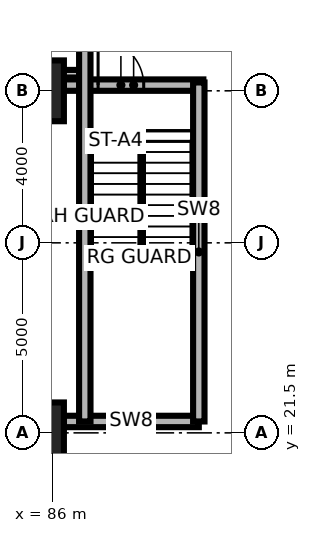
"""IFC4 building model, lengths in metres.
Left out: names, types, materials, properties, quantities, classifications, styles, units other than length and angle.
Written with IfcOpenShell. Run it as: python <this file> out.ifc"""

import sys

from ifc_helpers import new_model, si_unit, direction, frame, frame_2d, origin, origin_2d, place, context, subcontext, project, spatial, rectangle, extrude, element, fill, save


model = new_model("IFC4")
c1 = context("Model", 3, precision=1e-05, world=origin(), true_north=direction((0.0, 1.0)))
c2 = subcontext(c1, "Body", "Model", "MODEL_VIEW")
j1 = project(units=[si_unit("LENGTHUNIT", "METRE"), si_unit("PLANEANGLEUNIT", "RADIAN")], contexts=[c1])
p1 = place(None, origin())
s1 = spatial("IfcSite", under=j1, at=p1, CompositionType="ELEMENT")
p2 = place(p1, origin())
s2 = spatial("IfcBuilding", under=s1, at=p2, CompositionType="ELEMENT")
p3 = place(p2, origin())
s3 = spatial("IfcBuildingStorey", under=s2, at=p3, CompositionType="ELEMENT", Elevation=0.0)
for number, where, z_axis, x_axis in (
    (1, (85.5, 21.5, 0.0), (0.0, 0.0, 1.0), (1.0, 0.0, 0.0)),
    (2, (85.5, 30.5, 0.0), (0.0, 0.0, 1.0), (1.0, 0.0, 0.0)),
):
    element("IfcColumn", number, at=place(p3, frame(where, z_axis=z_axis, x_axis=x_axis)), inside=s3, PredefinedType="COLUMN", context=c2, shape_type="SweptSolid", body=[
        extrude(rectangle(XDim=1.6, YDim=1.6, at=origin_2d()), origin(), (0.0, 0.0, 1.0), 8.0),
    ])
p4 = place(p3, frame((86.3, 21.8, 0.0), z_axis=(0.0, 0.0, 1.0), x_axis=(1.0, 0.0, 0.0)))
e3 = element("IfcWall", 3, at=p4, inside=s3, PredefinedType="SHEAR", context=c2, shape_type="SweptSolid", body=[
    extrude(rectangle(XDim=3.55, YDim=0.3, at=frame_2d((1.775, 0.0))), origin(), (0.0, 0.0, 1.0), 7.7),
])
p5 = place(p3, frame((86.3, 30.65, 0.0), z_axis=(0.0, 0.0, 1.0), x_axis=(1.0, 0.0, 0.0)))
e4 = element("IfcWall", 4, at=p5, inside=s3, PredefinedType="SHEAR", context=c2, shape_type="SweptSolid", body=[
    extrude(rectangle(XDim=3.67, YDim=0.3, at=frame_2d((1.835, 0.0))), origin(), (0.0, 0.0, 1.0), 7.7),
])
p6 = place(p5, frame((0.9, 0.0, 0.0)))
e5 = element("IfcOpeningElement", 5, at=p6, cuts=e4, PredefinedType="OPENING", context=c2, shape_type="SweptSolid", body=[
    extrude(rectangle(XDim=1.2, YDim=2.1, at=frame_2d((0.6, 1.05))), frame((0.0, 0.16, 0.0), z_axis=(0.0, -1.0, 0.0), x_axis=(1.0, 0.0, 0.0)), (0.0, 0.0, 1.0), 0.32),
])
p7 = place(p3, frame((58.97, 30.95, 0.0), z_axis=(0.0, 0.0, 1.0), x_axis=(1.0, 0.0, 0.0)))
e6 = element("IfcWall", 6, at=p7, inside=s3, PredefinedType="PARTITIONING", context=c2, shape_type="SweptSolid", body=[
    extrude(rectangle(XDim=27.93, YDim=0.2, at=frame_2d((13.965, 0.0))), origin(), (0.0, 0.0, 1.0), 7.7),
])
p8 = place(p7, frame((6.13, 0.0, 0.0)))
e7 = element("IfcOpeningElement", 7, at=p8, cuts=e6, PredefinedType="OPENING", context=c2, shape_type="SweptSolid", body=[
    extrude(rectangle(XDim=1.4, YDim=2.1, at=frame_2d((0.7, 1.05))), frame((0.0, 0.11, 0.0), z_axis=(0.0, -1.0, 0.0), x_axis=(1.0, 0.0, 0.0)), (0.0, 0.0, 1.0), 0.22),
])
p9 = place(p7, frame((15.53, 0.0, 0.0)))
e8 = element("IfcOpeningElement", 8, at=p9, cuts=e6, PredefinedType="OPENING", context=c2, shape_type="SweptSolid", body=[
    extrude(rectangle(XDim=1.0, YDim=2.1, at=frame_2d((0.5, 1.05))), frame((0.0, 0.11, 0.0), z_axis=(0.0, -1.0, 0.0), x_axis=(1.0, 0.0, 0.0)), (0.0, 0.0, 1.0), 0.22),
])
p10 = place(p7, frame((22.73, 0.0, 0.0)))
e9 = element("IfcOpeningElement", 9, at=p10, cuts=e6, PredefinedType="OPENING", context=c2, shape_type="SweptSolid", body=[
    extrude(rectangle(XDim=1.0, YDim=2.1, at=frame_2d((0.5, 1.05))), frame((0.0, 0.11, 0.0), z_axis=(0.0, -1.0, 0.0), x_axis=(1.0, 0.0, 0.0)), (0.0, 0.0, 1.0), 0.22),
])
p11 = place(p3, frame((86.85, 21.8, 0.0), z_axis=(0.0, 0.0, 1.0), x_axis=(0.0, 1.0, 0.0)))
e10 = element("IfcWall", 10, at=p11, inside=s3, PredefinedType="SHEAR", context=c2, shape_type="SweptSolid", body=[
    extrude(rectangle(XDim=28.13, YDim=0.3, at=frame_2d((14.065, 0.0))), origin(), (0.0, 0.0, 1.0), 7.7),
])
p12 = place(p3, frame((89.85, 21.8, 0.0), z_axis=(0.0, 0.0, 1.0), x_axis=(0.0, 1.0, 0.0)))
e11 = element("IfcWall", 11, at=p12, inside=s3, PredefinedType="SHEAR", context=c2, shape_type="SweptSolid", body=[
    extrude(rectangle(XDim=8.92, YDim=0.3, at=frame_2d((4.46, 0.0))), origin(), (0.0, 0.0, 1.0), 7.7),
])
p13 = place(p6, origin())
e12 = element("IfcDoor", 12, at=p13, inside=s3, OperationType="SINGLE_SWING_LEFT", PredefinedType="DOOR", context=c2, shape_type="SweptSolid", body=[
    extrude(rectangle(XDim=1.2, YDim=2.1, at=frame_2d((0.6, 1.05))), frame((0.0, 0.025, 0.0), z_axis=(0.0, -1.0, 0.0), x_axis=(1.0, 0.0, 0.0)), (0.0, 0.0, 1.0), 0.05),
])
fill(e5, e12)
save(model, sys.argv[1])
